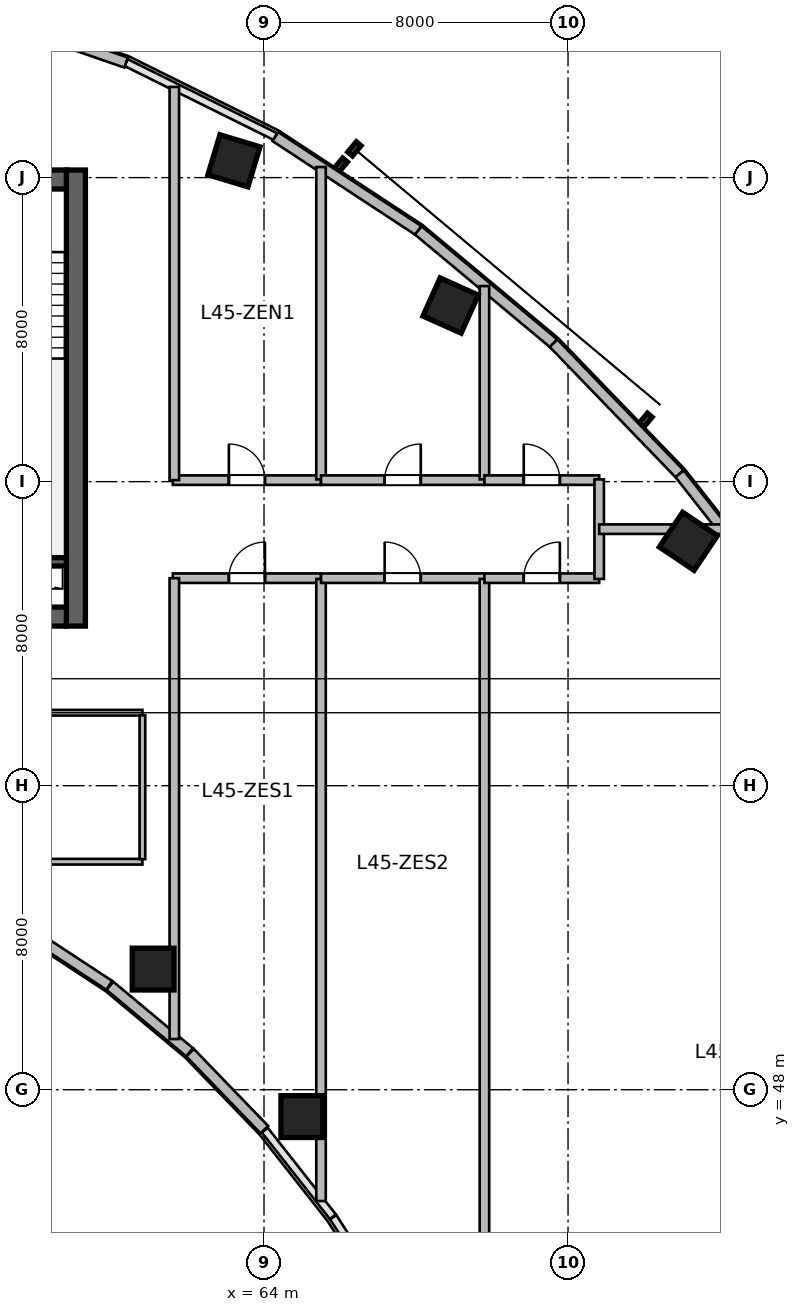
"""IFC4 building model, lengths in metres.
Left out: names, types, materials, properties, quantities, classifications, styles, units other than length and angle.
Written with IfcOpenShell. Run it as: python <this file> out.ifc"""

import sys

from ifc_helpers import new_model, si_unit, direction, frame, frame_2d, origin, origin_2d, place, context, subcontext, project, spatial, rectangle, circle, extrude, source, transform, mapped, element, fill, save


model = new_model("IFC4")
c1 = context("Model", 3, precision=1e-05, world=origin(), true_north=direction((0.0, 1.0)))
c2 = subcontext(c1, "Body", "Model", "MODEL_VIEW")
j1 = project(units=[si_unit("LENGTHUNIT", "METRE"), si_unit("PLANEANGLEUNIT", "RADIAN")], contexts=[c1])
p1 = place(None, origin())
s1 = spatial("IfcSite", under=j1, at=p1, CompositionType="ELEMENT")
p2 = place(p1, origin())
s2 = spatial("IfcBuilding", under=s1, at=p2, CompositionType="ELEMENT")
p3 = place(p2, frame((0.0, 0.0, 185.7)))
s3 = spatial("IfcBuildingStorey", under=s2, at=p3, CompositionType="ELEMENT", Elevation=185.7)
m1 = source(origin(), c2, "Body", "SweptSolid", [
    extrude(rectangle(XDim=12.0, YDim=0.5, at=frame_2d((6.0, 0.0))), origin(), (0.0, 0.0, 1.0), 3.9),
])
p4 = place(p3, frame((59.05, 60.2, 0.0), z_axis=(0.0, 0.0, 1.0), x_axis=(0.0, 1.0, 0.0)))
e1 = element("IfcWall", 1, at=p4, inside=s3, PredefinedType="SHEAR", context=c2, shape_type="MappedRepresentation", body=[
    mapped(m1, transform((0.0, 0.0, 0.0), scale=1.0)),
])
m2 = source(origin(), c2, "Body", "SweptSolid", [
    extrude(rectangle(XDim=21.6, YDim=0.5, at=frame_2d((10.8, 0.0))), origin(), (0.0, 0.0, 1.0), 3.9),
])
p5 = place(p3, frame((37.2, 60.45, 0.0), z_axis=(0.0, 0.0, 1.0), x_axis=(1.0, 0.0, 0.0)))
e2 = element("IfcWall", 2, at=p5, inside=s3, PredefinedType="SHEAR", context=c2, shape_type="MappedRepresentation", body=[
    mapped(m2, transform((0.0, 0.0, 0.0), scale=1.0)),
])
p6 = place(p5, frame((1.1, 0.0, 0.0)))
e3 = element("IfcOpeningElement", 3, at=p6, cuts=e2, PredefinedType="OPENING", context=c2, shape_type="SweptSolid", body=[
    extrude(rectangle(XDim=1.15, YDim=2.15, at=frame_2d((0.575, 1.075))), frame((0.0, 0.26, 0.0), z_axis=(0.0, -1.0, 0.0), x_axis=(1.0, 0.0, 0.0)), (0.0, 0.0, 1.0), 0.52),
])
p7 = place(p5, frame((19.5, 0.0, 0.0)))
e4 = element("IfcOpeningElement", 4, at=p7, cuts=e2, PredefinedType="OPENING", context=c2, shape_type="SweptSolid", body=[
    extrude(rectangle(XDim=0.9, YDim=2.1, at=frame_2d((0.45, 1.05))), frame((0.0, 0.26, 0.0), z_axis=(0.0, -1.0, 0.0), x_axis=(1.0, 0.0, 0.0)), (0.0, 0.0, 1.0), 0.52),
])
p8 = place(p5, frame((12.02, 0.0, 0.0)))
e5 = element("IfcOpeningElement", 5, at=p8, cuts=e2, PredefinedType="OPENING", context=c2, shape_type="SweptSolid", body=[
    extrude(rectangle(XDim=1.6, YDim=2.15, at=frame_2d((0.8, 1.075))), frame((0.0, 0.26, 0.0), z_axis=(0.0, -1.0, 0.0), x_axis=(1.0, 0.0, 0.0)), (0.0, 0.0, 1.0), 0.52),
])
p9 = place(p3, frame((37.2, 71.95, 0.0), z_axis=(0.0, 0.0, 1.0), x_axis=(1.0, 0.0, 0.0)))
e6 = element("IfcWall", 6, at=p9, inside=s3, PredefinedType="SHEAR", context=c2, shape_type="MappedRepresentation", body=[
    mapped(m2, transform((0.0, 0.0, 0.0), scale=1.0)),
])
p10 = place(p9, frame((1.2, 0.0, 0.0)))
e7 = element("IfcOpeningElement", 7, at=p10, cuts=e6, PredefinedType="OPENING", context=c2, shape_type="SweptSolid", body=[
    extrude(rectangle(XDim=0.9, YDim=2.1, at=frame_2d((0.45, 1.05))), frame((0.0, 0.26, 0.0), z_axis=(0.0, -1.0, 0.0), x_axis=(1.0, 0.0, 0.0)), (0.0, 0.0, 1.0), 0.52),
])
p11 = place(p9, frame((14.7, 0.0, 0.0)))
e8 = element("IfcOpeningElement", 8, at=p11, cuts=e6, PredefinedType="OPENING", context=c2, shape_type="SweptSolid", body=[
    extrude(rectangle(XDim=1.2, YDim=2.15, at=frame_2d((0.6, 1.075))), frame((0.0, 0.26, 0.0), z_axis=(0.0, -1.0, 0.0), x_axis=(1.0, 0.0, 0.0)), (0.0, 0.0, 1.0), 0.52),
])
p12 = place(p9, frame((4.15, 0.0, 0.0)))
e9 = element("IfcOpeningElement", 9, at=p12, cuts=e6, PredefinedType="OPENING", context=c2, shape_type="SweptSolid", body=[
    extrude(rectangle(XDim=1.3, YDim=2.15, at=frame_2d((0.65, 1.075))), frame((0.0, 0.26, 0.0), z_axis=(0.0, -1.0, 0.0), x_axis=(1.0, 0.0, 0.0)), (0.0, 0.0, 1.0), 0.52),
])
p13 = place(p9, frame((7.25, 0.0, 0.0)))
e10 = element("IfcOpeningElement", 10, at=p13, cuts=e6, PredefinedType="OPENING", context=c2, shape_type="SweptSolid", body=[
    extrude(rectangle(XDim=0.9, YDim=2.1, at=frame_2d((0.45, 1.05))), frame((0.0, 0.26, 0.0), z_axis=(0.0, -1.0, 0.0), x_axis=(1.0, 0.0, 0.0)), (0.0, 0.0, 1.0), 0.52),
])
m3 = source(origin(), c2, "Body", "SweptSolid", [
    extrude(rectangle(XDim=3.27, YDim=0.22, at=frame_2d((1.635, 0.0))), origin(), (0.0, 0.0, 1.0), 3.9),
])
p14 = place(p3, frame((55.53, 61.89, 0.0), z_axis=(0.0, 0.0, 1.0), x_axis=(1.0, 0.0, 0.0)))
e11 = element("IfcWall", 11, at=p14, inside=s3, PredefinedType="SHEAR", context=c2, shape_type="MappedRepresentation", body=[
    mapped(m3, transform((0.0, 0.0, 0.0), scale=1.0)),
])
m4 = source(origin(), c2, "Body", "SweptSolid", [
    extrude(rectangle(XDim=1.1, YDim=1.1, at=origin_2d()), origin(), (0.0, 0.0, 1.0), 3.9),
])
p15 = place(p3, frame((63.209, 72.442, 0.0), z_axis=(0.0, 0.0, 1.0), x_axis=(0.288697611798, 0.957420330337, 0.0)))
e12 = element("IfcColumn", 12, at=p15, inside=s3, PredefinedType="COLUMN", context=c2, shape_type="MappedRepresentation", body=[
    mapped(m4, transform((0.0, 0.0, 0.0), scale=1.0)),
])
m5 = source(origin(), c2, "Body", "SweptSolid", [
    extrude(circle(Radius=0.55, at=origin_2d()), origin(), (0.0, 0.0, 1.0), 3.9),
])
p16 = place(p3, frame((61.082, 51.175, 0.0), z_axis=(0.0, 0.0, 1.0), x_axis=(0.409126902895, 0.912477494148, 0.0)))
e13 = element("IfcColumn", 13, at=p16, inside=s3, PredefinedType="COLUMN", context=c2, shape_type="MappedRepresentation", body=[
    mapped(m5, transform((0.0, 0.0, 0.0), scale=1.0)),
])
p17 = place(p3, frame((68.91, 68.633, 0.0), z_axis=(0.0, 0.0, 1.0), x_axis=(0.409126902895, 0.912477494148, 0.0)))
e14 = element("IfcColumn", 14, at=p17, inside=s3, PredefinedType="COLUMN", context=c2, shape_type="MappedRepresentation", body=[
    mapped(m4, transform((0.0, 0.0, 0.0), scale=1.0)),
])
p18 = place(p3, frame((64.996, 47.294, 0.0), z_axis=(0.0, 0.0, 1.0), x_axis=(0.55774510898, 0.830012285095, 0.0)))
e15 = element("IfcColumn", 15, at=p18, inside=s3, PredefinedType="COLUMN", context=c2, shape_type="MappedRepresentation", body=[
    mapped(m5, transform((0.0, 0.0, 0.0), scale=1.0)),
])
p19 = place(p3, frame((75.167, 62.43, 0.0), z_axis=(0.0, 0.0, 1.0), x_axis=(0.55774510898, 0.830012285095, 0.0)))
e16 = element("IfcColumn", 16, at=p19, inside=s3, PredefinedType="COLUMN", context=c2, shape_type="MappedRepresentation", body=[
    mapped(m4, transform((0.0, 0.0, 0.0), scale=1.0)),
])
m6 = source(origin(), c2, "Body", "SweptSolid", [
    extrude(rectangle(XDim=2.812, YDim=0.28, at=frame_2d((1.406, 0.0))), origin(), (0.0, 0.0, 1.0), 3.58),
])
p20 = place(p3, frame((64.008, 46.95, 0.0), z_axis=(0.0, 0.0, 1.0), x_axis=(-0.694583668785, 0.719411931411, 0.0)))
e17 = element("IfcWall", 17, at=p20, inside=s3, PredefinedType="SOLIDWALL", context=c2, shape_type="MappedRepresentation", body=[
    mapped(m6, transform((0.0, 0.0, 0.0), scale=1.0)),
])
m7 = source(origin(), c2, "Body", "SweptSolid", [
    extrude(rectangle(XDim=2.729, YDim=0.28, at=frame_2d((1.365, 0.0))), origin(), (0.0, 0.0, 1.0), 3.58),
])
p21 = place(p3, frame((62.041, 48.987, 0.0), z_axis=(0.0, 0.0, 1.0), x_axis=(-0.767957284255, 0.640501061326, 0.0)))
e18 = element("IfcWall", 18, at=p21, inside=s3, PredefinedType="SOLIDWALL", context=c2, shape_type="MappedRepresentation", body=[
    mapped(m7, transform((0.0, 0.0, 0.0), scale=1.0)),
])
m8 = source(origin(), c2, "Body", "SweptSolid", [
    extrude(rectangle(XDim=2.652, YDim=0.28, at=frame_2d((1.326, 0.0))), origin(), (0.0, 0.0, 1.0), 3.58),
])
p22 = place(p3, frame((59.928, 50.747, 0.0), z_axis=(0.0, 0.0, 1.0), x_axis=(-0.836008323535, 0.54871676025, 0.0)))
e19 = element("IfcWall", 19, at=p22, inside=s3, PredefinedType="SOLIDWALL", context=c2, shape_type="MappedRepresentation", body=[
    mapped(m8, transform((0.0, 0.0, 0.0), scale=1.0)),
])
m9 = source(origin(), c2, "Body", "SweptSolid", [
    extrude(rectangle(XDim=4.29, YDim=0.28, at=frame_2d((2.145, 0.0))), origin(), (0.0, 0.0, 1.0), 3.58),
])
p23 = place(p3, frame((56.317, 76.431, 0.0), z_axis=(0.0, 0.0, 1.0), x_axis=(0.944883859218, -0.3274057003, 0.0)))
e20 = element("IfcWall", 20, at=p23, inside=s3, PredefinedType="SOLIDWALL", context=c2, shape_type="MappedRepresentation", body=[
    mapped(m9, transform((0.0, 0.0, 0.0), scale=1.0)),
])
m10 = source(origin(), c2, "Body", "SweptSolid", [
    extrude(rectangle(XDim=4.501, YDim=0.28, at=frame_2d((2.25, 0.0))), origin(), (0.0, 0.0, 1.0), 3.58),
])
p24 = place(p3, frame((64.298, 73.08, 0.0), z_axis=(0.0, 0.0, 1.0), x_axis=(0.835984920737, -0.548752414391, 0.0)))
e21 = element("IfcWall", 21, at=p24, inside=s3, PredefinedType="SOLIDWALL", context=c2, shape_type="MappedRepresentation", body=[
    mapped(m10, transform((0.0, 0.0, 0.0), scale=1.0)),
])
m11 = source(origin(), c2, "Body", "SweptSolid", [
    extrude(rectangle(XDim=4.634, YDim=0.28, at=frame_2d((2.317, 0.0))), origin(), (0.0, 0.0, 1.0), 3.58),
])
p25 = place(p3, frame((68.061, 70.61, 0.0), z_axis=(0.0, 0.0, 1.0), x_axis=(0.767910229096, -0.640557475993, 0.0)))
e22 = element("IfcWall", 22, at=p25, inside=s3, PredefinedType="SOLIDWALL", context=c2, shape_type="MappedRepresentation", body=[
    mapped(m11, transform((0.0, 0.0, 0.0), scale=1.0)),
])
m12 = source(origin(), c2, "Body", "SweptSolid", [
    extrude(rectangle(XDim=4.776, YDim=0.28, at=frame_2d((2.388, 0.0))), origin(), (0.0, 0.0, 1.0), 3.58),
])
p26 = place(p3, frame((71.619, 67.642, 0.0), z_axis=(0.0, 0.0, 1.0), x_axis=(0.694601811851, -0.719394414055, 0.0)))
e23 = element("IfcWall", 23, at=p26, inside=s3, PredefinedType="SOLIDWALL", context=c2, shape_type="MappedRepresentation", body=[
    mapped(m12, transform((0.0, 0.0, 0.0), scale=1.0)),
])
m13 = source(origin(), c2, "Body", "SweptSolid", [
    extrude(rectangle(XDim=4.922, YDim=0.28, at=frame_2d((2.461, 0.0))), origin(), (0.0, 0.0, 1.0), 3.58),
])
p27 = place(p3, frame((74.936, 64.206, 0.0), z_axis=(0.0, 0.0, 1.0), x_axis=(0.61817639101, -0.786039407153, 0.0)))
e24 = element("IfcWall", 24, at=p27, inside=s3, PredefinedType="SOLIDWALL", context=c2, shape_type="MappedRepresentation", body=[
    mapped(m13, transform((0.0, 0.0, 0.0), scale=1.0)),
])
m14 = source(origin(), c2, "Body", "SweptSolid", [
    extrude(rectangle(XDim=6.6, YDim=0.15, at=frame_2d((3.3, 0.0))), origin(), (0.0, 0.0, 1.0), 3.025),
])
p28 = place(p3, frame((54.2, 54.0, 0.0), z_axis=(0.0, 0.0, 1.0), x_axis=(1.0, 0.0, 0.0)))
e25 = element("IfcWall", 25, at=p28, inside=s3, PredefinedType="PARTITIONING", context=c2, shape_type="MappedRepresentation", body=[
    mapped(m14, transform((0.0, 0.0, 0.0), scale=1.0)),
])
m15 = source(origin(), c2, "Body", "SweptSolid", [
    extrude(rectangle(XDim=6.6, YDim=0.15, at=frame_2d((3.3, 0.0))), origin(), (0.0, 0.0, 1.0), 3.58),
])
p29 = place(p3, frame((54.2, 57.92, 0.0), z_axis=(0.0, 0.0, 1.0), x_axis=(1.0, 0.0, 0.0)))
e26 = element("IfcWall", 26, at=p29, inside=s3, PredefinedType="PARTITIONING", context=c2, shape_type="MappedRepresentation", body=[
    mapped(m15, transform((0.0, 0.0, 0.0), scale=1.0)),
])
p30 = place(p29, frame((2.825, 0.0, 0.0)))
e27 = element("IfcOpeningElement", 27, at=p30, cuts=e26, PredefinedType="OPENING", context=c2, shape_type="SweptSolid", body=[
    extrude(rectangle(XDim=0.95, YDim=2.1, at=frame_2d((0.475, 1.05))), frame((0.0, 0.085, 0.0), z_axis=(0.0, -1.0, 0.0), x_axis=(1.0, 0.0, 0.0)), (0.0, 0.0, 1.0), 0.17),
])
m16 = source(origin(), c2, "Body", "SweptSolid", [
    extrude(rectangle(XDim=3.785, YDim=0.15, at=frame_2d((1.893, 0.0))), origin(), (0.0, 0.0, 1.0), 3.58),
])
p31 = place(p3, frame((60.8, 54.067, 0.0), z_axis=(0.0, 0.0, 1.0), x_axis=(0.0, 1.0, 0.0)))
e28 = element("IfcWall", 28, at=p31, inside=s3, PredefinedType="PARTITIONING", context=c2, shape_type="MappedRepresentation", body=[
    mapped(m16, transform((0.0, 0.0, 0.0), scale=1.0)),
])
m17 = source(origin(), c2, "Body", "SweptSolid", [
    extrude(rectangle(XDim=3.9, YDim=0.25, at=frame_2d((1.95, 0.0))), origin(), (0.0, 0.0, 1.0), 3.58),
])
p32 = place(p3, frame((61.6, 64.04, 0.0), z_axis=(0.0, 0.0, 1.0), x_axis=(1.0, 0.0, 0.0)))
e29 = element("IfcWall", 29, at=p32, inside=s3, PredefinedType="PARTITIONING", context=c2, shape_type="MappedRepresentation", body=[
    mapped(m17, transform((0.0, 0.0, 0.0), scale=1.0)),
])
p33 = place(p32, frame((1.475, 0.0, 0.0)))
e30 = element("IfcOpeningElement", 30, at=p33, cuts=e29, PredefinedType="OPENING", context=c2, shape_type="SweptSolid", body=[
    extrude(rectangle(XDim=0.95, YDim=2.1, at=frame_2d((0.475, 1.05))), frame((0.0, 0.135, 0.0), z_axis=(0.0, -1.0, 0.0), x_axis=(1.0, 0.0, 0.0)), (0.0, 0.0, 1.0), 0.27),
])
m18 = source(origin(), c2, "Body", "SweptSolid", [
    extrude(rectangle(XDim=8.219, YDim=0.25, at=frame_2d((4.109, 0.0))), origin(), (0.0, 0.0, 1.0), 3.58),
])
p34 = place(p3, frame((65.5, 64.06, 0.0), z_axis=(0.0, 0.0, 1.0), x_axis=(0.0, 1.0, 0.0)))
e31 = element("IfcWall", 31, at=p34, inside=s3, PredefinedType="PARTITIONING", context=c2, shape_type="MappedRepresentation", body=[
    mapped(m18, transform((0.0, 0.0, 0.0), scale=1.0)),
])
m19 = source(origin(), c2, "Body", "SweptSolid", [
    extrude(rectangle(XDim=4.3, YDim=0.25, at=frame_2d((2.15, 0.0))), origin(), (0.0, 0.0, 1.0), 3.58),
])
p35 = place(p3, frame((65.5, 64.04, 0.0), z_axis=(0.0, 0.0, 1.0), x_axis=(1.0, 0.0, 0.0)))
e32 = element("IfcWall", 32, at=p35, inside=s3, PredefinedType="PARTITIONING", context=c2, shape_type="MappedRepresentation", body=[
    mapped(m19, transform((0.0, 0.0, 0.0), scale=1.0)),
])
p36 = place(p35, frame((1.675, 0.0, 0.0)))
e33 = element("IfcOpeningElement", 33, at=p36, cuts=e32, PredefinedType="OPENING", context=c2, shape_type="SweptSolid", body=[
    extrude(rectangle(XDim=0.95, YDim=2.1, at=frame_2d((0.475, 1.05))), frame((0.0, 0.135, 0.0), z_axis=(0.0, -1.0, 0.0), x_axis=(1.0, 0.0, 0.0)), (0.0, 0.0, 1.0), 0.27),
])
m20 = source(origin(), c2, "Body", "SweptSolid", [
    extrude(rectangle(XDim=5.086, YDim=0.25, at=frame_2d((2.543, 0.0))), origin(), (0.0, 0.0, 1.0), 3.58),
])
p37 = place(p3, frame((69.8, 64.06, 0.0), z_axis=(0.0, 0.0, 1.0), x_axis=(0.0, 1.0, 0.0)))
e34 = element("IfcWall", 34, at=p37, inside=s3, PredefinedType="PARTITIONING", context=c2, shape_type="MappedRepresentation", body=[
    mapped(m20, transform((0.0, 0.0, 0.0), scale=1.0)),
])
m21 = source(origin(), c2, "Body", "SweptSolid", [
    extrude(rectangle(XDim=3.02, YDim=0.25, at=frame_2d((1.51, 0.0))), origin(), (0.0, 0.0, 1.0), 3.58),
])
p38 = place(p3, frame((69.8, 64.04, 0.0), z_axis=(0.0, 0.0, 1.0), x_axis=(1.0, 0.0, 0.0)))
e35 = element("IfcWall", 35, at=p38, inside=s3, PredefinedType="PARTITIONING", context=c2, shape_type="MappedRepresentation", body=[
    mapped(m21, transform((0.0, 0.0, 0.0), scale=1.0)),
])
p39 = place(p38, frame((1.035, 0.0, 0.0)))
e36 = element("IfcOpeningElement", 36, at=p39, cuts=e35, PredefinedType="OPENING", context=c2, shape_type="SweptSolid", body=[
    extrude(rectangle(XDim=0.95, YDim=2.1, at=frame_2d((0.475, 1.05))), frame((0.0, 0.135, 0.0), z_axis=(0.0, -1.0, 0.0), x_axis=(1.0, 0.0, 0.0)), (0.0, 0.0, 1.0), 0.27),
])
p40 = place(p3, frame((61.6, 61.46, 0.0), z_axis=(0.0, 0.0, 1.0), x_axis=(1.0, 0.0, 0.0)))
e37 = element("IfcWall", 37, at=p40, inside=s3, PredefinedType="PARTITIONING", context=c2, shape_type="MappedRepresentation", body=[
    mapped(m17, transform((0.0, 0.0, 0.0), scale=1.0)),
])
p41 = place(p40, frame((1.475, 0.0, 0.0)))
e38 = element("IfcOpeningElement", 38, at=p41, cuts=e37, PredefinedType="OPENING", context=c2, shape_type="SweptSolid", body=[
    extrude(rectangle(XDim=0.95, YDim=2.1, at=frame_2d((0.475, 1.05))), frame((0.0, 0.135, 0.0), z_axis=(0.0, -1.0, 0.0), x_axis=(1.0, 0.0, 0.0)), (0.0, 0.0, 1.0), 0.27),
])
m22 = source(origin(), c2, "Body", "SweptSolid", [
    extrude(rectangle(XDim=16.369, YDim=0.25, at=frame_2d((8.185, 0.0))), origin(), (0.0, 0.0, 1.0), 2.872),
])
p42 = place(p3, frame((65.5, 45.071, 0.0), z_axis=(0.0, 0.0, 1.0), x_axis=(0.0, 1.0, 0.0)))
e39 = element("IfcWall", 39, at=p42, inside=s3, PredefinedType="PARTITIONING", context=c2, shape_type="MappedRepresentation", body=[
    mapped(m22, transform((0.0, 0.0, 0.0), scale=1.0)),
])
p43 = place(p3, frame((65.5, 61.46, 0.0), z_axis=(0.0, 0.0, 1.0), x_axis=(1.0, 0.0, 0.0)))
e40 = element("IfcWall", 40, at=p43, inside=s3, PredefinedType="PARTITIONING", context=c2, shape_type="MappedRepresentation", body=[
    mapped(m19, transform((0.0, 0.0, 0.0), scale=1.0)),
])
p44 = place(p43, frame((1.675, 0.0, 0.0)))
e41 = element("IfcOpeningElement", 41, at=p44, cuts=e40, PredefinedType="OPENING", context=c2, shape_type="SweptSolid", body=[
    extrude(rectangle(XDim=0.95, YDim=2.1, at=frame_2d((0.475, 1.05))), frame((0.0, 0.135, 0.0), z_axis=(0.0, -1.0, 0.0), x_axis=(1.0, 0.0, 0.0)), (0.0, 0.0, 1.0), 0.27),
])
m23 = source(origin(), c2, "Body", "SweptSolid", [
    extrude(rectangle(XDim=22.806, YDim=0.25, at=frame_2d((11.403, 0.0))), origin(), (0.0, 0.0, 1.0), 2.872),
])
p45 = place(p3, frame((69.8, 38.634, 0.0), z_axis=(0.0, 0.0, 1.0), x_axis=(0.0, 1.0, 0.0)))
e42 = element("IfcWall", 42, at=p45, inside=s3, PredefinedType="PARTITIONING", context=c2, shape_type="MappedRepresentation", body=[
    mapped(m23, transform((0.0, 0.0, 0.0), scale=1.0)),
])
p46 = place(p3, frame((69.8, 61.46, 0.0), z_axis=(0.0, 0.0, 1.0), x_axis=(1.0, 0.0, 0.0)))
e43 = element("IfcWall", 43, at=p46, inside=s3, PredefinedType="PARTITIONING", context=c2, shape_type="MappedRepresentation", body=[
    mapped(m21, transform((0.0, 0.0, 0.0), scale=1.0)),
])
p47 = place(p46, frame((1.035, 0.0, 0.0)))
e44 = element("IfcOpeningElement", 44, at=p47, cuts=e43, PredefinedType="OPENING", context=c2, shape_type="SweptSolid", body=[
    extrude(rectangle(XDim=0.95, YDim=2.1, at=frame_2d((0.475, 1.05))), frame((0.0, 0.135, 0.0), z_axis=(0.0, -1.0, 0.0), x_axis=(1.0, 0.0, 0.0)), (0.0, 0.0, 1.0), 0.27),
])
m24 = source(origin(), c2, "Body", "SweptSolid", [
    extrude(rectangle(XDim=12.126, YDim=0.25, at=frame_2d((6.063, 0.0))), origin(), (0.0, 0.0, 1.0), 2.872),
])
p48 = place(p3, frame((61.64, 49.334, 0.0), z_axis=(0.0, 0.0, 1.0), x_axis=(0.0, 1.0, 0.0)))
e45 = element("IfcWall", 45, at=p48, inside=s3, PredefinedType="PARTITIONING", context=c2, shape_type="MappedRepresentation", body=[
    mapped(m24, transform((0.0, 0.0, 0.0), scale=1.0)),
])
m25 = source(origin(), c2, "Body", "SweptSolid", [
    extrude(rectangle(XDim=10.346, YDim=0.25, at=frame_2d((5.173, 0.0))), origin(), (0.0, 0.0, 1.0), 3.58),
])
p49 = place(p3, frame((61.64, 64.04, 0.0), z_axis=(0.0, 0.0, 1.0), x_axis=(0.0, 1.0, 0.0)))
e46 = element("IfcWall", 46, at=p49, inside=s3, PredefinedType="PARTITIONING", context=c2, shape_type="MappedRepresentation", body=[
    mapped(m25, transform((0.0, 0.0, 0.0), scale=1.0)),
])
m26 = source(origin(), c2, "Body", "SweptSolid", [
    extrude(rectangle(XDim=2.62, YDim=0.25, at=frame_2d((1.31, 0.0))), origin(), (0.0, 0.0, 1.0), 3.023),
])
p50 = place(p3, frame((72.82, 61.44, 0.0), z_axis=(0.0, 0.0, 1.0), x_axis=(0.0, 1.0, 0.0)))
e47 = element("IfcWall", 47, at=p50, inside=s3, PredefinedType="PARTITIONING", context=c2, shape_type="MappedRepresentation", body=[
    mapped(m26, transform((0.0, 0.0, 0.0), scale=1.0)),
])
m27 = source(origin(), c2, "Body", "SweptSolid", [
    extrude(rectangle(XDim=3.249, YDim=0.25, at=frame_2d((1.625, 0.0))), origin(), (0.0, 0.0, 1.0), 3.58),
])
p51 = place(p3, frame((72.82, 62.75, 0.0), z_axis=(0.0, 0.0, 1.0), x_axis=(1.0, 0.0, 0.0)))
e48 = element("IfcWall", 48, at=p51, inside=s3, PredefinedType="PARTITIONING", context=c2, shape_type="MappedRepresentation", body=[
    mapped(m27, transform((0.0, 0.0, 0.0), scale=1.0)),
])
m28 = source(origin(), c2, "Body", "SweptSolid", [
    extrude(rectangle(XDim=0.95, YDim=2.1, at=frame_2d((0.475, 1.05))), frame((0.0, 0.025, 0.0), z_axis=(0.0, -1.0, 0.0), x_axis=(1.0, 0.0, 0.0)), (0.0, 0.0, 1.0), 0.05),
])
p52 = place(p33, origin())
e49 = element("IfcDoor", 49, at=p52, inside=s3, OperationType="SINGLE_SWING_LEFT", PredefinedType="DOOR", context=c2, shape_type="MappedRepresentation", body=[
    mapped(m28, transform((0.0, 0.0, 0.0), scale=1.0)),
])
fill(e30, e49)
p53 = place(p36, origin())
e50 = element("IfcDoor", 50, at=p53, inside=s3, OperationType="SINGLE_SWING_RIGHT", PredefinedType="DOOR", context=c2, shape_type="MappedRepresentation", body=[
    mapped(m28, transform((0.0, 0.0, 0.0), scale=1.0)),
])
fill(e33, e50)
p54 = place(p39, origin())
e51 = element("IfcDoor", 51, at=p54, inside=s3, OperationType="SINGLE_SWING_LEFT", PredefinedType="DOOR", context=c2, shape_type="MappedRepresentation", body=[
    mapped(m28, transform((0.0, 0.0, 0.0), scale=1.0)),
])
fill(e36, e51)
p55 = place(p41, origin())
e52 = element("IfcDoor", 52, at=p55, inside=s3, OperationType="SINGLE_SWING_RIGHT", PredefinedType="DOOR", context=c2, shape_type="MappedRepresentation", body=[
    mapped(m28, transform((0.0, 0.0, 0.0), scale=1.0)),
])
fill(e38, e52)
p56 = place(p44, origin())
e53 = element("IfcDoor", 53, at=p56, inside=s3, OperationType="SINGLE_SWING_LEFT", PredefinedType="DOOR", context=c2, shape_type="MappedRepresentation", body=[
    mapped(m28, transform((0.0, 0.0, 0.0), scale=1.0)),
])
fill(e41, e53)
p57 = place(p47, origin())
e54 = element("IfcDoor", 54, at=p57, inside=s3, OperationType="SINGLE_SWING_RIGHT", PredefinedType="DOOR", context=c2, shape_type="MappedRepresentation", body=[
    mapped(m28, transform((0.0, 0.0, 0.0), scale=1.0)),
])
fill(e44, e54)
save(model, sys.argv[1])
